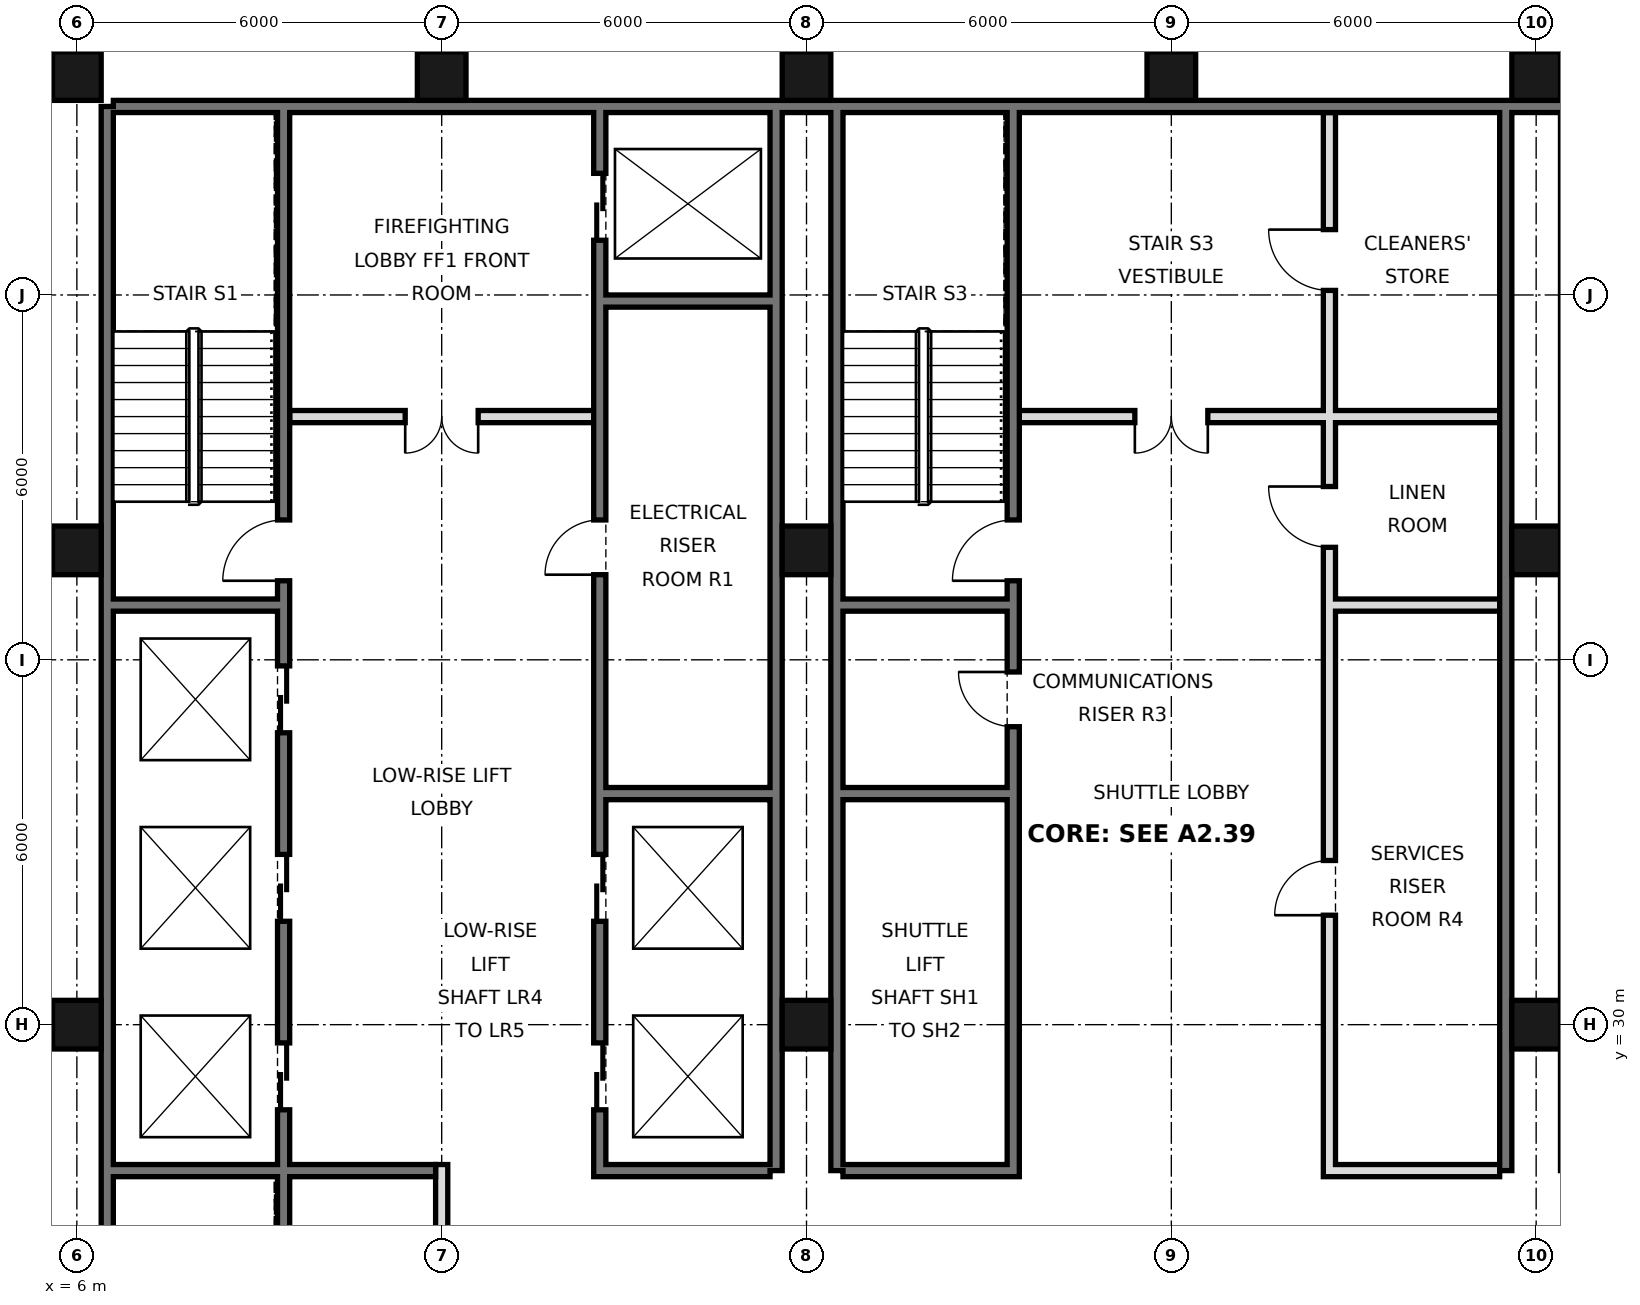
"""IFC4 building model, lengths in metres.
Left out: names, types, materials, properties, quantities, classifications, styles, units other than length and angle.
Written with IfcOpenShell. Run it as: python <this file> out.ifc"""

import sys

from ifc_helpers import new_model, si_unit, direction, frame, frame_2d, origin, origin_2d, place, context, subcontext, project, spatial, rectangle, hollow_rectangle, extrude, element, fill, save


model = new_model("IFC4")
c1 = context("Model", 3, precision=1e-05, world=origin(), true_north=direction((0.0, 1.0)))
c2 = subcontext(c1, "Body", "Model", "MODEL_VIEW")
j1 = project(units=[si_unit("LENGTHUNIT", "METRE"), si_unit("PLANEANGLEUNIT", "RADIAN")], contexts=[c1])
p1 = place(None, origin())
s1 = spatial("IfcSite", under=j1, at=p1, CompositionType="ELEMENT")
p2 = place(p1, origin())
s2 = spatial("IfcBuilding", under=s1, at=p2, CompositionType="ELEMENT")
p3 = place(p2, frame((0.0, 0.0, 154.6)))
s3 = spatial("IfcBuildingStorey", under=s2, at=p3, CompositionType="ELEMENT", Elevation=154.6)
for number, where, z_axis, x_axis in (
    (1, (6.0, 30.0, 0.0), (0.0, 0.0, 1.0), (1.0, 0.0, 0.0)),
    (2, (6.0, 37.8, 0.0), (0.0, 0.0, 1.0), (1.0, 0.0, 0.0)),
    (3, (6.0, 45.6, 0.0), (0.0, 0.0, 1.0), (1.0, 0.0, 0.0)),
    (4, (12.0, 45.6, 0.0), (0.0, 0.0, 1.0), (1.0, 0.0, 0.0)),
    (5, (18.0, 30.0, 0.0), (0.0, 0.0, 1.0), (1.0, 0.0, 0.0)),
    (6, (18.0, 37.8, 0.0), (0.0, 0.0, 1.0), (1.0, 0.0, 0.0)),
    (7, (18.0, 45.6, 0.0), (0.0, 0.0, 1.0), (1.0, 0.0, 0.0)),
    (8, (24.0, 45.6, 0.0), (0.0, 0.0, 1.0), (1.0, 0.0, 0.0)),
    (9, (30.0, 30.0, 0.0), (0.0, 0.0, 1.0), (1.0, 0.0, 0.0)),
    (10, (30.0, 37.8, 0.0), (0.0, 0.0, 1.0), (1.0, 0.0, 0.0)),
    (11, (30.0, 45.6, 0.0), (0.0, 0.0, 1.0), (1.0, 0.0, 0.0)),
):
    element("IfcColumn", number, at=place(p3, frame(where, z_axis=z_axis, x_axis=x_axis)), inside=s3, PredefinedType="COLUMN", context=c2, shape_type="SweptSolid", body=[
        extrude(hollow_rectangle(XDim=0.8, YDim=0.8, WallThickness=0.045, at=origin_2d()), origin(), (0.0, 0.0, 1.0), 3.6),
    ])
p4 = place(p3, frame((6.5, 21.6, 0.0), z_axis=(0.0, 0.0, 1.0), x_axis=(0.0, 1.0, 0.0)))
e12 = element("IfcWall", 12, at=p4, inside=s3, PredefinedType="SOLIDWALL", context=c2, shape_type="SweptSolid", body=[
    extrude(rectangle(XDim=23.5, YDim=0.2, at=frame_2d((11.75, 0.0))), origin(), (0.0, 0.0, 1.0), 3.42),
])
p5 = place(p3, frame((6.6, 45.1, 0.0), z_axis=(0.0, 0.0, 1.0), x_axis=(1.0, 0.0, 0.0)))
e13 = element("IfcWall", 13, at=p5, inside=s3, PredefinedType="SOLIDWALL", context=c2, shape_type="SweptSolid", body=[
    extrude(rectangle(XDim=34.8, YDim=0.2, at=frame_2d((17.4, 0.0))), origin(), (0.0, 0.0, 1.0), 3.42),
])
for number, where, z_axis, x_axis in (
    (14, (17.5, 27.6, 0.0), (0.0, 0.0, 1.0), (0.0, 1.0, 0.0)),
    (15, (18.5, 27.6, 0.0), (0.0, 0.0, 1.0), (0.0, 1.0, 0.0)),
    (16, (29.5, 27.6, 0.0), (0.0, 0.0, 1.0), (0.0, 1.0, 0.0)),
):
    element("IfcWall", number, at=place(p3, frame(where, z_axis=z_axis, x_axis=x_axis)), inside=s3, PredefinedType="SOLIDWALL", context=c2, shape_type="SweptSolid", body=[
        extrude(rectangle(XDim=17.5, YDim=0.2, at=frame_2d((8.75, 0.0))), origin(), (0.0, 0.0, 1.0), 3.42),
    ])
p6 = place(p3, frame((12.0, 21.6, 0.0), z_axis=(0.0, 0.0, 1.0), x_axis=(0.0, 1.0, 0.0)))
e17 = element("IfcWall", 17, at=p6, inside=s3, PredefinedType="PARTITIONING", context=c2, shape_type="SweptSolid", body=[
    extrude(rectangle(XDim=6.1, YDim=0.2, at=frame_2d((3.05, 0.0))), origin(), (0.0, 0.0, 1.0), 3.42),
])
p7 = place(p3, frame((14.6, 27.5, 0.0), z_axis=(0.0, 0.0, 1.0), x_axis=(0.0, 1.0, 0.0)))
e18 = element("IfcWall", 18, at=p7, inside=s3, PredefinedType="SOLIDWALL", context=c2, shape_type="SweptSolid", body=[
    extrude(rectangle(XDim=17.5, YDim=0.2, at=frame_2d((8.75, 0.0))), origin(), (0.0, 0.0, 1.0), 3.42),
])
p8 = place(p7, frame((1.1, 0.0, 0.0)))
e19 = element("IfcOpeningElement", 19, at=p8, cuts=e18, PredefinedType="OPENING", context=c2, shape_type="SweptSolid", body=[
    extrude(rectangle(XDim=1.1, YDim=2.1, at=frame_2d((0.55, 1.05))), frame((0.0, 0.11, 0.0), z_axis=(0.0, -1.0, 0.0), x_axis=(1.0, 0.0, 0.0)), (0.0, 0.0, 1.0), 0.22),
])
p9 = place(p7, frame((4.2, 0.0, 0.0)))
e20 = element("IfcOpeningElement", 20, at=p9, cuts=e18, PredefinedType="OPENING", context=c2, shape_type="SweptSolid", body=[
    extrude(rectangle(XDim=1.1, YDim=2.1, at=frame_2d((0.55, 1.05))), frame((0.0, 0.11, 0.0), z_axis=(0.0, -1.0, 0.0), x_axis=(1.0, 0.0, 0.0)), (0.0, 0.0, 1.0), 0.22),
])
p10 = place(p7, frame((15.4, 0.0, 0.0)))
e21 = element("IfcOpeningElement", 21, at=p10, cuts=e18, PredefinedType="OPENING", context=c2, shape_type="SweptSolid", body=[
    extrude(rectangle(XDim=1.1, YDim=2.1, at=frame_2d((0.55, 1.05))), frame((0.0, 0.11, 0.0), z_axis=(0.0, -1.0, 0.0), x_axis=(1.0, 0.0, 0.0)), (0.0, 0.0, 1.0), 0.22),
])
p11 = place(p7, frame((9.9, 0.0, 0.0)))
e22 = element("IfcOpeningElement", 22, at=p11, cuts=e18, PredefinedType="OPENING", context=c2, shape_type="SweptSolid", body=[
    extrude(rectangle(XDim=0.9, YDim=2.1, at=frame_2d((0.45, 1.05))), frame((0.0, 0.11, 0.0), z_axis=(0.0, -1.0, 0.0), x_axis=(1.0, 0.0, 0.0)), (0.0, 0.0, 1.0), 0.22),
])
p12 = place(p3, frame((21.4, 27.5, 0.0), z_axis=(0.0, 0.0, 1.0), x_axis=(0.0, 1.0, 0.0)))
e23 = element("IfcWall", 23, at=p12, inside=s3, PredefinedType="SOLIDWALL", context=c2, shape_type="SweptSolid", body=[
    extrude(rectangle(XDim=17.5, YDim=0.2, at=frame_2d((8.75, 0.0))), origin(), (0.0, 0.0, 1.0), 3.42),
])
p13 = place(p12, frame((9.8, 0.0, 0.0)))
e24 = element("IfcOpeningElement", 24, at=p13, cuts=e23, PredefinedType="OPENING", context=c2, shape_type="SweptSolid", body=[
    extrude(rectangle(XDim=1.0, YDim=2.1, at=frame_2d((0.5, 1.05))), frame((0.0, 0.11, 0.0), z_axis=(0.0, -1.0, 0.0), x_axis=(1.0, 0.0, 0.0)), (0.0, 0.0, 1.0), 0.22),
])
p14 = place(p12, frame((7.4, 0.0, 0.0)))
e25 = element("IfcOpeningElement", 25, at=p14, cuts=e23, PredefinedType="OPENING", context=c2, shape_type="SweptSolid", body=[
    extrude(rectangle(XDim=0.9, YDim=2.1, at=frame_2d((0.45, 1.05))), frame((0.0, 0.11, 0.0), z_axis=(0.0, -1.0, 0.0), x_axis=(1.0, 0.0, 0.0)), (0.0, 0.0, 1.0), 0.22),
])
p15 = place(p3, frame((26.6, 27.5, 0.0), z_axis=(0.0, 0.0, 1.0), x_axis=(0.0, 1.0, 0.0)))
e26 = element("IfcWall", 26, at=p15, inside=s3, PredefinedType="SOLIDWALL", context=c2, shape_type="SweptSolid", body=[
    extrude(rectangle(XDim=17.5, YDim=0.2, at=frame_2d((8.75, 0.0))), origin(), (0.0, 0.0, 1.0), 3.42),
])
p16 = place(p15, frame((4.3, 0.0, 0.0)))
e27 = element("IfcOpeningElement", 27, at=p16, cuts=e26, PredefinedType="OPENING", context=c2, shape_type="SweptSolid", body=[
    extrude(rectangle(XDim=0.9, YDim=2.1, at=frame_2d((0.45, 1.05))), frame((0.0, 0.11, 0.0), z_axis=(0.0, -1.0, 0.0), x_axis=(1.0, 0.0, 0.0)), (0.0, 0.0, 1.0), 0.22),
])
p17 = place(p15, frame((10.35, 0.0, 0.0)))
e28 = element("IfcOpeningElement", 28, at=p17, cuts=e26, PredefinedType="OPENING", context=c2, shape_type="SweptSolid", body=[
    extrude(rectangle(XDim=1.0, YDim=2.1, at=frame_2d((0.5, 1.05))), frame((0.0, 0.11, 0.0), z_axis=(0.0, -1.0, 0.0), x_axis=(1.0, 0.0, 0.0)), (0.0, 0.0, 1.0), 0.22),
])
p18 = place(p15, frame((14.575, 0.0, 0.0)))
e29 = element("IfcOpeningElement", 29, at=p18, cuts=e26, PredefinedType="OPENING", context=c2, shape_type="SweptSolid", body=[
    extrude(rectangle(XDim=1.0, YDim=2.1, at=frame_2d((0.5, 1.05))), frame((0.0, 0.11, 0.0), z_axis=(0.0, -1.0, 0.0), x_axis=(1.0, 0.0, 0.0)), (0.0, 0.0, 1.0), 0.22),
])
p19 = place(p3, frame((9.4, 21.6, 0.0), z_axis=(0.0, 0.0, 1.0), x_axis=(0.0, 1.0, 0.0)))
e30 = element("IfcWall", 30, at=p19, inside=s3, PredefinedType="SOLIDWALL", context=c2, shape_type="SweptSolid", body=[
    extrude(rectangle(XDim=23.4, YDim=0.2, at=frame_2d((11.7, 0.0))), origin(), (0.0, 0.0, 1.0), 3.42),
])
p20 = place(p19, frame((7.0, 0.0, 0.0)))
e31 = element("IfcOpeningElement", 31, at=p20, cuts=e30, PredefinedType="OPENING", context=c2, shape_type="SweptSolid", body=[
    extrude(rectangle(XDim=1.1, YDim=2.1, at=frame_2d((0.55, 1.05))), frame((0.0, 0.11, 0.0), z_axis=(0.0, -1.0, 0.0), x_axis=(1.0, 0.0, 0.0)), (0.0, 0.0, 1.0), 0.22),
])
p21 = place(p19, frame((10.1, 0.0, 0.0)))
e32 = element("IfcOpeningElement", 32, at=p21, cuts=e30, PredefinedType="OPENING", context=c2, shape_type="SweptSolid", body=[
    extrude(rectangle(XDim=1.1, YDim=2.1, at=frame_2d((0.55, 1.05))), frame((0.0, 0.11, 0.0), z_axis=(0.0, -1.0, 0.0), x_axis=(1.0, 0.0, 0.0)), (0.0, 0.0, 1.0), 0.22),
])
p22 = place(p19, frame((13.2, 0.0, 0.0)))
e33 = element("IfcOpeningElement", 33, at=p22, cuts=e30, PredefinedType="OPENING", context=c2, shape_type="SweptSolid", body=[
    extrude(rectangle(XDim=1.1, YDim=2.1, at=frame_2d((0.55, 1.05))), frame((0.0, 0.11, 0.0), z_axis=(0.0, -1.0, 0.0), x_axis=(1.0, 0.0, 0.0)), (0.0, 0.0, 1.0), 0.22),
])
p23 = place(p19, frame((15.7, 0.0, 0.0)))
e34 = element("IfcOpeningElement", 34, at=p23, cuts=e30, PredefinedType="OPENING", context=c2, shape_type="SweptSolid", body=[
    extrude(rectangle(XDim=1.0, YDim=2.1, at=frame_2d((0.5, 1.05))), frame((0.0, 0.11, 0.0), z_axis=(0.0, -1.0, 0.0), x_axis=(1.0, 0.0, 0.0)), (0.0, 0.0, 1.0), 0.22),
])
p24 = place(p19, frame((0.175, 0.0, 0.0)))
e35 = element("IfcOpeningElement", 35, at=p24, cuts=e30, PredefinedType="OPENING", context=c2, shape_type="SweptSolid", body=[
    extrude(rectangle(XDim=0.9, YDim=2.1, at=frame_2d((0.45, 1.05))), frame((0.0, 0.11, 0.0), z_axis=(0.0, -1.0, 0.0), x_axis=(1.0, 0.0, 0.0)), (0.0, 0.0, 1.0), 0.22),
])
for number, where, z_axis, x_axis in (
    (36, (14.7, 27.6, 0.0), (0.0, 0.0, 1.0), (1.0, 0.0, 0.0)),
    (37, (18.6, 27.6, 0.0), (0.0, 0.0, 1.0), (1.0, 0.0, 0.0)),
    (38, (26.7, 27.6, 0.0), (0.0, 0.0, 1.0), (1.0, 0.0, 0.0)),
):
    element("IfcWall", number, at=place(p3, frame(where, z_axis=z_axis, x_axis=x_axis)), inside=s3, PredefinedType="SOLIDWALL", context=c2, shape_type="SweptSolid", body=[
        extrude(rectangle(XDim=2.7, YDim=0.2, at=frame_2d((1.35, 0.0))), origin(), (0.0, 0.0, 1.0), 3.42),
    ])
p25 = place(p3, frame((6.6, 27.6, 0.0), z_axis=(0.0, 0.0, 1.0), x_axis=(1.0, 0.0, 0.0)))
e39 = element("IfcWall", 39, at=p25, inside=s3, PredefinedType="SOLIDWALL", context=c2, shape_type="SweptSolid", body=[
    extrude(rectangle(XDim=5.3, YDim=0.2, at=frame_2d((2.65, 0.0))), origin(), (0.0, 0.0, 1.0), 3.42),
])
for number, where, z_axis, x_axis in (
    (40, (14.7, 33.8, 0.0), (0.0, 0.0, 1.0), (1.0, 0.0, 0.0)),
    (41, (18.6, 33.8, 0.0), (0.0, 0.0, 1.0), (1.0, 0.0, 0.0)),
    (42, (18.6, 36.9, 0.0), (0.0, 0.0, 1.0), (1.0, 0.0, 0.0)),
    (43, (26.7, 36.9, 0.0), (0.0, 0.0, 1.0), (1.0, 0.0, 0.0)),
    (44, (6.6, 36.9, 0.0), (0.0, 0.0, 1.0), (1.0, 0.0, 0.0)),
):
    element("IfcWall", number, at=place(p3, frame(where, z_axis=z_axis, x_axis=x_axis)), inside=s3, PredefinedType="SOLIDWALL", context=c2, shape_type="SweptSolid", body=[
        extrude(rectangle(XDim=2.7, YDim=0.2, at=frame_2d((1.35, 0.0))), origin(), (0.0, 0.0, 1.0), 3.42),
    ])
p26 = place(p3, frame((21.5, 40.0, 0.0), z_axis=(0.0, 0.0, 1.0), x_axis=(1.0, 0.0, 0.0)))
e45 = element("IfcWall", 45, at=p26, inside=s3, PredefinedType="PARTITIONING", context=c2, shape_type="SweptSolid", body=[
    extrude(rectangle(XDim=7.9, YDim=0.2, at=frame_2d((3.95, 0.0))), origin(), (0.0, 0.0, 1.0), 3.42),
])
p27 = place(p26, frame((1.9, 0.0, 0.0)))
e46 = element("IfcOpeningElement", 46, at=p27, cuts=e45, PredefinedType="OPENING", context=c2, shape_type="SweptSolid", body=[
    extrude(rectangle(XDim=1.2, YDim=2.1, at=frame_2d((0.6, 1.05))), frame((0.0, 0.11, 0.0), z_axis=(0.0, -1.0, 0.0), x_axis=(1.0, 0.0, 0.0)), (0.0, 0.0, 1.0), 0.22),
])
p28 = place(p3, frame((9.5, 40.0, 0.0), z_axis=(0.0, 0.0, 1.0), x_axis=(1.0, 0.0, 0.0)))
e47 = element("IfcWall", 47, at=p28, inside=s3, PredefinedType="PARTITIONING", context=c2, shape_type="SweptSolid", body=[
    extrude(rectangle(XDim=5.0, YDim=0.2, at=frame_2d((2.5, 0.0))), origin(), (0.0, 0.0, 1.0), 3.42),
])
p29 = place(p28, frame((1.9, 0.0, 0.0)))
e48 = element("IfcOpeningElement", 48, at=p29, cuts=e47, PredefinedType="OPENING", context=c2, shape_type="SweptSolid", body=[
    extrude(rectangle(XDim=1.2, YDim=2.1, at=frame_2d((0.6, 1.05))), frame((0.0, 0.11, 0.0), z_axis=(0.0, -1.0, 0.0), x_axis=(1.0, 0.0, 0.0)), (0.0, 0.0, 1.0), 0.22),
])
p30 = place(p3, frame((14.7, 41.9, 0.0), z_axis=(0.0, 0.0, 1.0), x_axis=(1.0, 0.0, 0.0)))
e49 = element("IfcWall", 49, at=p30, inside=s3, PredefinedType="SOLIDWALL", context=c2, shape_type="SweptSolid", body=[
    extrude(rectangle(XDim=2.7, YDim=0.2, at=frame_2d((1.35, 0.0))), origin(), (0.0, 0.0, 1.0), 3.42),
])
p31 = place(p29, frame((1.2, 0.0, 0.0), z_axis=(0.0, 0.0, 1.0), x_axis=(-1.0, 0.0, 0.0)))
e50 = element("IfcDoor", 50, at=p31, inside=s3, OperationType="DOUBLE_DOOR_SINGLE_SWING", PredefinedType="DOOR", context=c2, shape_type="SweptSolid", body=[
    extrude(rectangle(XDim=1.2, YDim=2.1, at=frame_2d((0.6, 1.05))), frame((0.0, 0.025, 0.0), z_axis=(0.0, -1.0, 0.0), x_axis=(1.0, 0.0, 0.0)), (0.0, 0.0, 1.0), 0.05),
])
fill(e48, e50)
p32 = place(p27, frame((1.2, 0.0, 0.0), z_axis=(0.0, 0.0, 1.0), x_axis=(-1.0, 0.0, 0.0)))
e51 = element("IfcDoor", 51, at=p32, inside=s3, OperationType="DOUBLE_DOOR_SINGLE_SWING", PredefinedType="DOOR", context=c2, shape_type="SweptSolid", body=[
    extrude(rectangle(XDim=1.2, YDim=2.1, at=frame_2d((0.6, 1.05))), frame((0.0, 0.025, 0.0), z_axis=(0.0, -1.0, 0.0), x_axis=(1.0, 0.0, 0.0)), (0.0, 0.0, 1.0), 0.05),
])
fill(e46, e51)
p33 = place(p8, origin())
e52 = element("IfcDoor", 52, at=p33, inside=s3, OperationType="DOUBLE_DOOR_SLIDING", PredefinedType="DOOR", context=c2, shape_type="SweptSolid", body=[
    extrude(rectangle(XDim=1.1, YDim=2.1, at=frame_2d((0.55, 1.05))), frame((0.0, 0.025, 0.0), z_axis=(0.0, -1.0, 0.0), x_axis=(1.0, 0.0, 0.0)), (0.0, 0.0, 1.0), 0.05),
])
fill(e19, e52)
p34 = place(p9, origin())
e53 = element("IfcDoor", 53, at=p34, inside=s3, OperationType="DOUBLE_DOOR_SLIDING", PredefinedType="DOOR", context=c2, shape_type="SweptSolid", body=[
    extrude(rectangle(XDim=1.1, YDim=2.1, at=frame_2d((0.55, 1.05))), frame((0.0, 0.025, 0.0), z_axis=(0.0, -1.0, 0.0), x_axis=(1.0, 0.0, 0.0)), (0.0, 0.0, 1.0), 0.05),
])
fill(e20, e53)
p35 = place(p10, origin())
e54 = element("IfcDoor", 54, at=p35, inside=s3, OperationType="DOUBLE_DOOR_SLIDING", PredefinedType="DOOR", context=c2, shape_type="SweptSolid", body=[
    extrude(rectangle(XDim=1.1, YDim=2.1, at=frame_2d((0.55, 1.05))), frame((0.0, 0.025, 0.0), z_axis=(0.0, -1.0, 0.0), x_axis=(1.0, 0.0, 0.0)), (0.0, 0.0, 1.0), 0.05),
])
fill(e21, e54)
p36 = place(p20, origin())
e55 = element("IfcDoor", 55, at=p36, inside=s3, OperationType="DOUBLE_DOOR_SLIDING", PredefinedType="DOOR", context=c2, shape_type="SweptSolid", body=[
    extrude(rectangle(XDim=1.1, YDim=2.1, at=frame_2d((0.55, 1.05))), frame((0.0, 0.025, 0.0), z_axis=(0.0, -1.0, 0.0), x_axis=(1.0, 0.0, 0.0)), (0.0, 0.0, 1.0), 0.05),
])
fill(e31, e55)
p37 = place(p21, origin())
e56 = element("IfcDoor", 56, at=p37, inside=s3, OperationType="DOUBLE_DOOR_SLIDING", PredefinedType="DOOR", context=c2, shape_type="SweptSolid", body=[
    extrude(rectangle(XDim=1.1, YDim=2.1, at=frame_2d((0.55, 1.05))), frame((0.0, 0.025, 0.0), z_axis=(0.0, -1.0, 0.0), x_axis=(1.0, 0.0, 0.0)), (0.0, 0.0, 1.0), 0.05),
])
fill(e32, e56)
p38 = place(p22, origin())
e57 = element("IfcDoor", 57, at=p38, inside=s3, OperationType="DOUBLE_DOOR_SLIDING", PredefinedType="DOOR", context=c2, shape_type="SweptSolid", body=[
    extrude(rectangle(XDim=1.1, YDim=2.1, at=frame_2d((0.55, 1.05))), frame((0.0, 0.025, 0.0), z_axis=(0.0, -1.0, 0.0), x_axis=(1.0, 0.0, 0.0)), (0.0, 0.0, 1.0), 0.05),
])
fill(e33, e57)
p39 = place(p23, origin())
e58 = element("IfcDoor", 58, at=p39, inside=s3, OperationType="SINGLE_SWING_LEFT", PredefinedType="DOOR", context=c2, shape_type="SweptSolid", body=[
    extrude(rectangle(XDim=1.0, YDim=2.1, at=frame_2d((0.5, 1.05))), frame((0.0, 0.025, 0.0), z_axis=(0.0, -1.0, 0.0), x_axis=(1.0, 0.0, 0.0)), (0.0, 0.0, 1.0), 0.05),
])
fill(e34, e58)
p40 = place(p13, origin())
e59 = element("IfcDoor", 59, at=p40, inside=s3, OperationType="SINGLE_SWING_LEFT", PredefinedType="DOOR", context=c2, shape_type="SweptSolid", body=[
    extrude(rectangle(XDim=1.0, YDim=2.1, at=frame_2d((0.5, 1.05))), frame((0.0, 0.025, 0.0), z_axis=(0.0, -1.0, 0.0), x_axis=(1.0, 0.0, 0.0)), (0.0, 0.0, 1.0), 0.05),
])
fill(e24, e59)
p41 = place(p11, origin())
e60 = element("IfcDoor", 60, at=p41, inside=s3, OperationType="SINGLE_SWING_LEFT", PredefinedType="DOOR", context=c2, shape_type="SweptSolid", body=[
    extrude(rectangle(XDim=0.9, YDim=2.1, at=frame_2d((0.45, 1.05))), frame((0.0, 0.025, 0.0), z_axis=(0.0, -1.0, 0.0), x_axis=(1.0, 0.0, 0.0)), (0.0, 0.0, 1.0), 0.05),
])
fill(e22, e60)
p42 = place(p14, frame((0.9, 0.0, 0.0), z_axis=(0.0, 0.0, 1.0), x_axis=(-1.0, 0.0, 0.0)))
e61 = element("IfcDoor", 61, at=p42, inside=s3, OperationType="SINGLE_SWING_LEFT", PredefinedType="DOOR", context=c2, shape_type="SweptSolid", body=[
    extrude(rectangle(XDim=0.9, YDim=2.1, at=frame_2d((0.45, 1.05))), frame((0.0, 0.025, 0.0), z_axis=(0.0, -1.0, 0.0), x_axis=(1.0, 0.0, 0.0)), (0.0, 0.0, 1.0), 0.05),
])
fill(e25, e61)
p43 = place(p16, origin())
e62 = element("IfcDoor", 62, at=p43, inside=s3, OperationType="SINGLE_SWING_LEFT", PredefinedType="DOOR", context=c2, shape_type="SweptSolid", body=[
    extrude(rectangle(XDim=0.9, YDim=2.1, at=frame_2d((0.45, 1.05))), frame((0.0, 0.025, 0.0), z_axis=(0.0, -1.0, 0.0), x_axis=(1.0, 0.0, 0.0)), (0.0, 0.0, 1.0), 0.05),
])
fill(e27, e62)
p44 = place(p17, frame((1.0, 0.0, 0.0), z_axis=(0.0, 0.0, 1.0), x_axis=(-1.0, 0.0, 0.0)))
e63 = element("IfcDoor", 63, at=p44, inside=s3, OperationType="SINGLE_SWING_LEFT", PredefinedType="DOOR", context=c2, shape_type="SweptSolid", body=[
    extrude(rectangle(XDim=1.0, YDim=2.1, at=frame_2d((0.5, 1.05))), frame((0.0, 0.025, 0.0), z_axis=(0.0, -1.0, 0.0), x_axis=(1.0, 0.0, 0.0)), (0.0, 0.0, 1.0), 0.05),
])
fill(e28, e63)
p45 = place(p18, frame((1.0, 0.0, 0.0), z_axis=(0.0, 0.0, 1.0), x_axis=(-1.0, 0.0, 0.0)))
e64 = element("IfcDoor", 64, at=p45, inside=s3, OperationType="SINGLE_SWING_LEFT", PredefinedType="DOOR", context=c2, shape_type="SweptSolid", body=[
    extrude(rectangle(XDim=1.0, YDim=2.1, at=frame_2d((0.5, 1.05))), frame((0.0, 0.025, 0.0), z_axis=(0.0, -1.0, 0.0), x_axis=(1.0, 0.0, 0.0)), (0.0, 0.0, 1.0), 0.05),
])
fill(e29, e64)
save(model, sys.argv[1])
